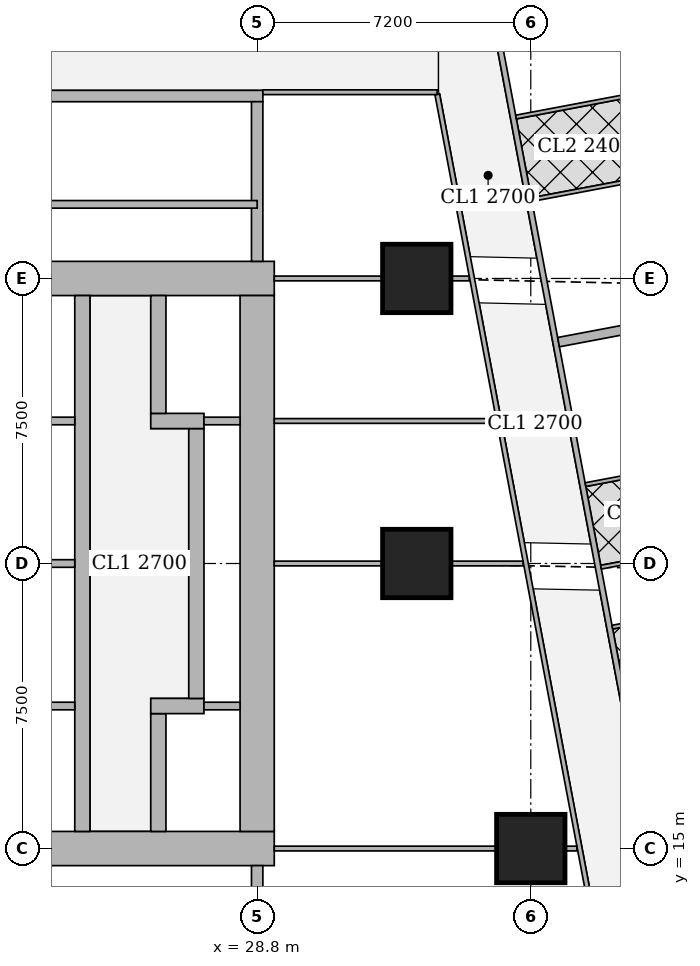
"""IFC4 building model, lengths in metres.
Left out: names, types, materials, properties, quantities, classifications, styles, units other than length and angle.
Written with IfcOpenShell. Run it as: python <this file> out.ifc"""

import sys

from ifc_helpers import new_model, si_unit, direction, frame, frame_2d, origin, origin_2d, place, context, subcontext, project, spatial, rectangle, extrude, element, fill, save


model = new_model("IFC4")
c1 = context("Model", 3, precision=1e-05, world=origin(), true_north=direction((0.0, 1.0)))
c2 = subcontext(c1, "Body", "Model", "MODEL_VIEW")
j1 = project(units=[si_unit("LENGTHUNIT", "METRE"), si_unit("PLANEANGLEUNIT", "RADIAN")], contexts=[c1])
p1 = place(None, origin())
s1 = spatial("IfcSite", under=j1, at=p1, CompositionType="ELEMENT")
p2 = place(p1, origin())
s2 = spatial("IfcBuilding", under=s1, at=p2, CompositionType="ELEMENT")
p3 = place(p2, frame((0.0, 0.0, 31.25)))
s3 = spatial("IfcBuildingStorey", under=s2, at=p3, CompositionType="ELEMENT", Elevation=31.25)
for number, where, z_axis, x_axis in (
    (1, (36.0, 15.0, 0.0), (0.0, 0.0, 1.0), (1.0, 0.0, 0.0)),
    (2, (33.0, 22.5, 0.0), (0.0, 0.0, 1.0), (1.0, 0.0, 0.0)),
    (3, (33.0, 30.0, 0.0), (0.0, 0.0, 1.0), (1.0, 0.0, 0.0)),
):
    element("IfcColumn", number, at=place(p3, frame(where, z_axis=z_axis, x_axis=x_axis)), inside=s3, PredefinedType="COLUMN", context=c2, shape_type="SweptSolid", body=[
        extrude(rectangle(XDim=1.8, YDim=1.8, at=origin_2d()), origin(), (0.0, 0.0, 1.0), 3.75),
    ])
p4 = place(p3, frame((13.95, 15.0, 0.0), z_axis=(0.0, 0.0, 1.0), x_axis=(1.0, 0.0, 0.0)))
e4 = element("IfcWall", 4, at=p4, inside=s3, PredefinedType="SHEAR", context=c2, shape_type="SweptSolid", body=[
    extrude(rectangle(XDim=15.3, YDim=0.9, at=frame_2d((7.65, 0.0))), origin(), (0.0, 0.0, 1.0), 3.75),
])
p5 = place(p4, frame((4.45, 0.0, 0.0)))
e5 = element("IfcOpeningElement", 5, at=p5, cuts=e4, PredefinedType="OPENING", context=c2, shape_type="SweptSolid", body=[
    extrude(rectangle(XDim=1.8, YDim=2.1, at=frame_2d((0.9, 1.05))), frame((0.0, 0.46, 0.0), z_axis=(0.0, -1.0, 0.0), x_axis=(1.0, 0.0, 0.0)), (0.0, 0.0, 1.0), 0.92),
])
p6 = place(p4, frame((10.7, 0.0, 0.0)))
e6 = element("IfcOpeningElement", 6, at=p6, cuts=e4, PredefinedType="OPENING", context=c2, shape_type="SweptSolid", body=[
    extrude(rectangle(XDim=1.1, YDim=2.1, at=frame_2d((0.55, 1.05))), frame((0.0, 0.46, 0.0), z_axis=(0.0, -1.0, 0.0), x_axis=(1.0, 0.0, 0.0)), (0.0, 0.0, 1.0), 0.92),
])
p7 = place(p3, frame((13.95, 30.0, 0.0), z_axis=(0.0, 0.0, 1.0), x_axis=(1.0, 0.0, 0.0)))
e7 = element("IfcWall", 7, at=p7, inside=s3, PredefinedType="SHEAR", context=c2, shape_type="SweptSolid", body=[
    extrude(rectangle(XDim=15.3, YDim=0.9, at=frame_2d((7.65, 0.0))), origin(), (0.0, 0.0, 1.0), 3.75),
])
p8 = place(p7, frame((4.45, 0.0, 0.0)))
e8 = element("IfcOpeningElement", 8, at=p8, cuts=e7, PredefinedType="OPENING", context=c2, shape_type="SweptSolid", body=[
    extrude(rectangle(XDim=1.8, YDim=2.1, at=frame_2d((0.9, 1.05))), frame((0.0, 0.46, 0.0), z_axis=(0.0, -1.0, 0.0), x_axis=(1.0, 0.0, 0.0)), (0.0, 0.0, 1.0), 0.92),
])
p9 = place(p7, frame((10.7, 0.0, 0.0)))
e9 = element("IfcOpeningElement", 9, at=p9, cuts=e7, PredefinedType="OPENING", context=c2, shape_type="SweptSolid", body=[
    extrude(rectangle(XDim=1.1, YDim=2.1, at=frame_2d((0.55, 1.05))), frame((0.0, 0.46, 0.0), z_axis=(0.0, -1.0, 0.0), x_axis=(1.0, 0.0, 0.0)), (0.0, 0.0, 1.0), 0.92),
])
p10 = place(p3, frame((28.8, 15.45, 0.0), z_axis=(0.0, 0.0, 1.0), x_axis=(0.0, 1.0, 0.0)))
e10 = element("IfcWall", 10, at=p10, inside=s3, PredefinedType="SHEAR", context=c2, shape_type="SweptSolid", body=[
    extrude(rectangle(XDim=14.1, YDim=0.9, at=frame_2d((7.05, 0.0))), origin(), (0.0, 0.0, 1.0), 3.75),
])
p11 = place(p3, frame((24.2, 15.45, 0.0), z_axis=(0.0, 0.0, 1.0), x_axis=(0.0, 1.0, 0.0)))
e11 = element("IfcWall", 11, at=p11, inside=s3, PredefinedType="SHEAR", context=c2, shape_type="SweptSolid", body=[
    extrude(rectangle(XDim=14.1, YDim=0.4, at=frame_2d((7.05, 0.0))), origin(), (0.0, 0.0, 1.0), 3.75),
])
p12 = place(p3, frame((26.2, 15.45, 0.0), z_axis=(0.0, 0.0, 1.0), x_axis=(0.0, 1.0, 0.0)))
e12 = element("IfcWall", 12, at=p12, inside=s3, PredefinedType="SHEAR", context=c2, shape_type="SweptSolid", body=[
    extrude(rectangle(XDim=3.1, YDim=0.4, at=frame_2d((1.55, 0.0))), origin(), (0.0, 0.0, 1.0), 3.75),
])
p13 = place(p12, frame((0.825, 0.0, 0.0)))
e13 = element("IfcOpeningElement", 13, at=p13, cuts=e12, PredefinedType="OPENING", context=c2, shape_type="SweptSolid", body=[
    extrude(rectangle(XDim=1.2, YDim=2.1, at=frame_2d((0.6, 1.05))), frame((0.0, 0.21, 0.0), z_axis=(0.0, -1.0, 0.0), x_axis=(1.0, 0.0, 0.0)), (0.0, 0.0, 1.0), 0.42),
])
p14 = place(p3, frame((26.0, 18.75, 0.0), z_axis=(0.0, 0.0, 1.0), x_axis=(1.0, 0.0, 0.0)))
e14 = element("IfcWall", 14, at=p14, inside=s3, PredefinedType="SHEAR", context=c2, shape_type="SweptSolid", body=[
    extrude(rectangle(XDim=1.4, YDim=0.4, at=frame_2d((0.7, 0.0))), origin(), (0.0, 0.0, 1.0), 3.75),
])
p15 = place(p3, frame((27.2, 18.95, 0.0), z_axis=(0.0, 0.0, 1.0), x_axis=(0.0, 1.0, 0.0)))
e15 = element("IfcWall", 15, at=p15, inside=s3, PredefinedType="SHEAR", context=c2, shape_type="SweptSolid", body=[
    extrude(rectangle(XDim=7.1, YDim=0.4, at=frame_2d((3.55, 0.0))), origin(), (0.0, 0.0, 1.0), 3.75),
])
p16 = place(p3, frame((26.0, 26.25, 0.0), z_axis=(0.0, 0.0, 1.0), x_axis=(1.0, 0.0, 0.0)))
e16 = element("IfcWall", 16, at=p16, inside=s3, PredefinedType="SHEAR", context=c2, shape_type="SweptSolid", body=[
    extrude(rectangle(XDim=1.4, YDim=0.4, at=frame_2d((0.7, 0.0))), origin(), (0.0, 0.0, 1.0), 3.75),
])
p17 = place(p3, frame((26.2, 26.45, 0.0), z_axis=(0.0, 0.0, 1.0), x_axis=(0.0, 1.0, 0.0)))
e17 = element("IfcWall", 17, at=p17, inside=s3, PredefinedType="SHEAR", context=c2, shape_type="SweptSolid", body=[
    extrude(rectangle(XDim=3.1, YDim=0.4, at=frame_2d((1.55, 0.0))), origin(), (0.0, 0.0, 1.0), 3.75),
])
p18 = place(p17, frame((1.075, 0.0, 0.0)))
e18 = element("IfcOpeningElement", 18, at=p18, cuts=e17, PredefinedType="OPENING", context=c2, shape_type="SweptSolid", body=[
    extrude(rectangle(XDim=1.2, YDim=2.1, at=frame_2d((0.6, 1.05))), frame((0.0, 0.21, 0.0), z_axis=(0.0, -1.0, 0.0), x_axis=(1.0, 0.0, 0.0)), (0.0, 0.0, 1.0), 0.42),
])
p19 = place(p3, frame((28.8, 10.35, 0.0), z_axis=(0.0, 0.0, 1.0), x_axis=(0.0, 1.0, 0.0)))
e19 = element("IfcWall", 19, at=p19, inside=s3, PredefinedType="SHEAR", context=c2, shape_type="SweptSolid", body=[
    extrude(rectangle(XDim=4.2, YDim=0.3, at=frame_2d((2.1, 0.0))), origin(), (0.0, 0.0, 1.0), 3.75),
])
p20 = place(p3, frame((21.45, 34.8, 0.0), z_axis=(0.0, 0.0, 1.0), x_axis=(1.0, 0.0, 0.0)))
e20 = element("IfcWall", 20, at=p20, inside=s3, PredefinedType="SHEAR", context=c2, shape_type="SweptSolid", body=[
    extrude(rectangle(XDim=7.5, YDim=0.3, at=frame_2d((3.75, 0.0))), origin(), (0.0, 0.0, 1.0), 3.75),
])
p21 = place(p20, frame((0.5, 0.0, 0.0)))
e21 = element("IfcOpeningElement", 21, at=p21, cuts=e20, PredefinedType="OPENING", context=c2, shape_type="SweptSolid", body=[
    extrude(rectangle(XDim=1.1, YDim=2.1, at=frame_2d((0.55, 1.05))), frame((0.0, 0.16, 0.0), z_axis=(0.0, -1.0, 0.0), x_axis=(1.0, 0.0, 0.0)), (0.0, 0.0, 1.0), 0.32),
])
p22 = place(p3, frame((28.8, 30.45, 0.0), z_axis=(0.0, 0.0, 1.0), x_axis=(0.0, 1.0, 0.0)))
e22 = element("IfcWall", 22, at=p22, inside=s3, PredefinedType="SHEAR", context=c2, shape_type="SweptSolid", body=[
    extrude(rectangle(XDim=4.2, YDim=0.3, at=frame_2d((2.1, 0.0))), origin(), (0.0, 0.0, 1.0), 3.75),
])
p23 = place(p3, frame((35.094, 36.585, 0.0), z_axis=(0.0, 0.0, 1.0), x_axis=(0.185588860311, -0.982627485331, 0.0)))
e23 = element("IfcWall", 23, at=p23, inside=s3, PredefinedType="SOLIDWALL", context=c2, shape_type="SweptSolid", body=[
    extrude(rectangle(XDim=34.797, YDim=0.15, at=frame_2d((17.399, 0.0))), origin(), (0.0, 0.0, 1.0), 2.5),
])
p24 = place(p23, frame((6.012, 0.0, 0.0)))
e24 = element("IfcOpeningElement", 24, at=p24, cuts=e23, PredefinedType="OPENING", context=c2, shape_type="SweptSolid", body=[
    extrude(rectangle(XDim=1.0, YDim=2.1, at=frame_2d((0.5, 1.05))), frame((0.0, 0.085, 0.0), z_axis=(0.0, -1.0, 0.0), x_axis=(1.0, 0.0, 0.0)), (0.0, 0.0, 1.0), 0.17),
])
p25 = place(p23, frame((9.828, 0.0, 0.0)))
e25 = element("IfcOpeningElement", 25, at=p25, cuts=e23, PredefinedType="OPENING", context=c2, shape_type="SweptSolid", body=[
    extrude(rectangle(XDim=1.0, YDim=2.1, at=frame_2d((0.5, 1.05))), frame((0.0, 0.085, 0.0), z_axis=(0.0, -1.0, 0.0), x_axis=(1.0, 0.0, 0.0)), (0.0, 0.0, 1.0), 0.17),
])
p26 = place(p23, frame((25.9, 0.0, 0.0)))
e26 = element("IfcOpeningElement", 26, at=p26, cuts=e23, PredefinedType="OPENING", context=c2, shape_type="SweptSolid", body=[
    extrude(rectangle(XDim=1.0, YDim=2.1, at=frame_2d((0.5, 1.05))), frame((0.0, 0.085, 0.0), z_axis=(0.0, -1.0, 0.0), x_axis=(1.0, 0.0, 0.0)), (0.0, 0.0, 1.0), 0.17),
])
p27 = place(p3, frame((37.514, 42.089, 0.0), z_axis=(0.0, 0.0, 1.0), x_axis=(0.185543450498, -0.982636060796, 0.0)))
e27 = element("IfcWall", 27, at=p27, inside=s3, PredefinedType="PARTITIONING", context=c2, shape_type="SweptSolid", body=[
    extrude(rectangle(XDim=9.513, YDim=0.1, at=frame_2d((4.757, 0.0))), origin(), (0.0, 0.0, 1.0), 3.5),
])
p28 = place(p27, frame((8.008, 0.0, 0.0)))
e28 = element("IfcOpeningElement", 28, at=p28, cuts=e27, PredefinedType="OPENING", context=c2, shape_type="SweptSolid", body=[
    extrude(rectangle(XDim=0.9, YDim=2.1, at=frame_2d((0.45, 1.05))), frame((0.0, 0.06, 0.0), z_axis=(0.0, -1.0, 0.0), x_axis=(1.0, 0.0, 0.0)), (0.0, 0.0, 1.0), 0.12),
])
p29 = place(p27, frame((2.63, 0.0, 0.0)))
e29 = element("IfcOpeningElement", 29, at=p29, cuts=e27, PredefinedType="OPENING", context=c2, shape_type="SweptSolid", body=[
    extrude(rectangle(XDim=0.9, YDim=2.1, at=frame_2d((0.45, 1.05))), frame((0.0, 0.06, 0.0), z_axis=(0.0, -1.0, 0.0), x_axis=(1.0, 0.0, 0.0)), (0.0, 0.0, 1.0), 0.12),
])
p30 = place(p27, frame((5.341, 0.0, 0.0)))
e30 = element("IfcOpeningElement", 30, at=p30, cuts=e27, PredefinedType="OPENING", context=c2, shape_type="SweptSolid", body=[
    extrude(rectangle(XDim=0.9, YDim=2.1, at=frame_2d((0.45, 1.05))), frame((0.0, 0.06, 0.0), z_axis=(0.0, -1.0, 0.0), x_axis=(1.0, 0.0, 0.0)), (0.0, 0.0, 1.0), 0.12),
])
p31 = place(p3, frame((39.289, 32.692, 0.0), z_axis=(0.0, 0.0, 1.0), x_axis=(-0.982633623707, -0.185556356831, 0.0)))
e31 = element("IfcWall", 31, at=p31, inside=s3, PredefinedType="PARTITIONING", context=c2, shape_type="SweptSolid", body=[
    extrude(rectangle(XDim=3.325, YDim=0.1, at=frame_2d((1.663, 0.0))), origin(), (0.0, 0.0, 1.0), 3.5),
])
p32 = place(p3, frame((38.829, 34.855, 0.0), z_axis=(0.0, 0.0, 1.0), x_axis=(-0.982610347627, -0.185679575441, 0.0)))
e32 = element("IfcWall", 32, at=p32, inside=s3, PredefinedType="PARTITIONING", context=c2, shape_type="SweptSolid", body=[
    extrude(rectangle(XDim=3.274, YDim=0.1, at=frame_2d((1.637, 0.0))), origin(), (0.0, 0.0, 1.0), 3.5),
])
for number, where, z_axis, x_axis in (
    (33, (40.657, 25.183, 0.0), (0.0, 0.0, 1.0), (-0.983, -0.186, 0.0)),
    (34, (41.365, 21.433, 0.0), (0.0, 0.0, 1.0), (-0.983, -0.186, 0.0)),
):
    element("IfcWall", number, at=place(p3, frame(where, z_axis=z_axis, x_axis=x_axis)), inside=s3, PredefinedType="PARTITIONING", context=c2, shape_type="SweptSolid", body=[
        extrude(rectangle(XDim=3.275, YDim=0.1, at=frame_2d((1.637, 0.0))), origin(), (0.0, 0.0, 1.0), 3.5),
    ])
p33 = place(p3, frame((41.067, 23.011, 0.0), z_axis=(0.0, 0.0, 1.0), x_axis=(-0.982618057925, -0.185638768151, 0.0)))
e35 = element("IfcWall", 35, at=p33, inside=s3, PredefinedType="PARTITIONING", context=c2, shape_type="SweptSolid", body=[
    extrude(rectangle(XDim=3.275, YDim=0.1, at=frame_2d((1.637, 0.0))), origin(), (0.0, 0.0, 1.0), 2.5),
])
p34 = place(p3, frame((41.177, 29.164, 0.0), z_axis=(0.0, 0.0, 1.0), x_axis=(-0.982612837616, -0.185666398014, 0.0)))
e36 = element("IfcWall", 36, at=p34, inside=s3, PredefinedType="SOLIDWALL", context=c2, shape_type="SweptSolid", body=[
    extrude(rectangle(XDim=4.525, YDim=0.25, at=frame_2d((2.262, 0.0))), origin(), (0.0, 0.0, 1.0), 2.5),
])
p35 = place(p3, frame((28.95, 34.9, 0.0), z_axis=(0.0, 0.0, 1.0), x_axis=(1.0, 0.0, 0.0)))
e37 = element("IfcWall", 37, at=p35, inside=s3, PredefinedType="PARTITIONING", context=c2, shape_type="SweptSolid", body=[
    extrude(rectangle(XDim=4.588, YDim=0.125, at=frame_2d((2.294, 0.0))), origin(), (0.0, 0.0, 1.0), 3.5),
])
p36 = place(p3, frame((38.202, 10.163, 0.0), z_axis=(0.0, 0.0, 1.0), x_axis=(-0.185610321132, 0.982623431783, 0.0)))
e38 = element("IfcWall", 38, at=p36, inside=s3, PredefinedType="PARTITIONING", context=c2, shape_type="SweptSolid", body=[
    extrude(rectangle(XDim=25.111, YDim=0.125, at=frame_2d((12.556, 0.0))), origin(), (0.0, 0.0, 1.0), 2.5),
])
p37 = place(p36, frame((0.708, 0.0, 0.0)))
e39 = element("IfcOpeningElement", 39, at=p37, cuts=e38, PredefinedType="OPENING", context=c2, shape_type="SweptSolid", body=[
    extrude(rectangle(XDim=1.0, YDim=2.1, at=frame_2d((0.5, 1.05))), frame((0.0, 0.073, 0.0), z_axis=(0.0, -1.0, 0.0), x_axis=(1.0, 0.0, 0.0)), (0.0, 0.0, 1.0), 0.145),
])
p38 = place(p36, frame((6.1, 0.0, 0.0)))
e40 = element("IfcOpeningElement", 40, at=p38, cuts=e38, PredefinedType="OPENING", context=c2, shape_type="SweptSolid", body=[
    extrude(rectangle(XDim=1.0, YDim=2.1, at=frame_2d((0.5, 1.05))), frame((0.0, 0.073, 0.0), z_axis=(0.0, -1.0, 0.0), x_axis=(1.0, 0.0, 0.0)), (0.0, 0.0, 1.0), 0.145),
])
p39 = place(p36, frame((13.378, 0.0, 0.0)))
e41 = element("IfcOpeningElement", 41, at=p39, cuts=e38, PredefinedType="OPENING", context=c2, shape_type="SweptSolid", body=[
    extrude(rectangle(XDim=1.0, YDim=2.1, at=frame_2d((0.5, 1.05))), frame((0.0, 0.073, 0.0), z_axis=(0.0, -1.0, 0.0), x_axis=(1.0, 0.0, 0.0)), (0.0, 0.0, 1.0), 0.145),
])
p40 = place(p36, frame((17.194, 0.0, 0.0)))
e42 = element("IfcOpeningElement", 42, at=p40, cuts=e38, PredefinedType="OPENING", context=c2, shape_type="SweptSolid", body=[
    extrude(rectangle(XDim=1.0, YDim=2.1, at=frame_2d((0.5, 1.05))), frame((0.0, 0.073, 0.0), z_axis=(0.0, -1.0, 0.0), x_axis=(1.0, 0.0, 0.0)), (0.0, 0.0, 1.0), 0.145),
])
p41 = place(p36, frame((21.35, 0.0, 0.0)))
e43 = element("IfcOpeningElement", 43, at=p41, cuts=e38, PredefinedType="OPENING", context=c2, shape_type="SweptSolid", body=[
    extrude(rectangle(XDim=1.0, YDim=2.1, at=frame_2d((0.5, 1.05))), frame((0.0, 0.073, 0.0), z_axis=(0.0, -1.0, 0.0), x_axis=(1.0, 0.0, 0.0)), (0.0, 0.0, 1.0), 0.145),
])
p42 = place(p3, frame((29.25, 15.0, 0.0), z_axis=(0.0, 0.0, 1.0), x_axis=(1.0, 0.0, 0.0)))
e44 = element("IfcWall", 44, at=p42, inside=s3, PredefinedType="PARTITIONING", context=c2, shape_type="SweptSolid", body=[
    extrude(rectangle(XDim=5.849, YDim=0.125, at=frame_2d((2.925, 0.0))), origin(), (0.0, 0.0, 1.0), 3.5),
])
p43 = place(p3, frame((36.901, 15.0, 0.0), z_axis=(0.0, 0.0, 1.0), x_axis=(1.0, 0.0, 0.0)))
e45 = element("IfcWall", 45, at=p43, inside=s3, PredefinedType="PARTITIONING", context=c2, shape_type="SweptSolid", body=[
    extrude(rectangle(XDim=0.312, YDim=0.125, at=frame_2d((0.156, 0.0))), origin(), (0.0, 0.0, 1.0), 3.5),
])
p44 = place(p3, frame((29.25, 22.5, 0.0), z_axis=(0.0, 0.0, 1.0), x_axis=(1.0, 0.0, 0.0)))
e46 = element("IfcWall", 46, at=p44, inside=s3, PredefinedType="PARTITIONING", context=c2, shape_type="SweptSolid", body=[
    extrude(rectangle(XDim=2.849, YDim=0.125, at=frame_2d((1.425, 0.0))), origin(), (0.0, 0.0, 1.0), 3.5),
])
p45 = place(p3, frame((33.901, 22.5, 0.0), z_axis=(0.0, 0.0, 1.0), x_axis=(1.0, 0.0, 0.0)))
e47 = element("IfcWall", 47, at=p45, inside=s3, PredefinedType="PARTITIONING", context=c2, shape_type="SweptSolid", body=[
    extrude(rectangle(XDim=1.895, YDim=0.125, at=frame_2d((0.948, 0.0))), origin(), (0.0, 0.0, 1.0), 2.5),
])
p46 = place(p3, frame((29.25, 26.25, 0.0), z_axis=(0.0, 0.0, 1.0), x_axis=(1.0, 0.0, 0.0)))
e48 = element("IfcWall", 48, at=p46, inside=s3, PredefinedType="PARTITIONING", context=c2, shape_type="SweptSolid", body=[
    extrude(rectangle(XDim=5.838, YDim=0.125, at=frame_2d((2.919, 0.0))), origin(), (0.0, 0.0, 1.0), 3.5),
])
p47 = place(p3, frame((29.25, 30.0, 0.0), z_axis=(0.0, 0.0, 1.0), x_axis=(1.0, 0.0, 0.0)))
e49 = element("IfcWall", 49, at=p47, inside=s3, PredefinedType="PARTITIONING", context=c2, shape_type="SweptSolid", body=[
    extrude(rectangle(XDim=2.849, YDim=0.125, at=frame_2d((1.425, 0.0))), origin(), (0.0, 0.0, 1.0), 3.5),
])
p48 = place(p3, frame((33.901, 30.0, 0.0), z_axis=(0.0, 0.0, 1.0), x_axis=(1.0, 0.0, 0.0)))
e50 = element("IfcWall", 50, at=p48, inside=s3, PredefinedType="PARTITIONING", context=c2, shape_type="SweptSolid", body=[
    extrude(rectangle(XDim=0.478, YDim=0.125, at=frame_2d((0.239, 0.0))), origin(), (0.0, 0.0, 1.0), 2.5),
])
p49 = place(p3, frame((23.0, 31.95, 0.0), z_axis=(0.0, 0.0, 1.0), x_axis=(1.0, 0.0, 0.0)))
e51 = element("IfcWall", 51, at=p49, inside=s3, PredefinedType="SHEAR", context=c2, shape_type="SweptSolid", body=[
    extrude(rectangle(XDim=5.8, YDim=0.2, at=frame_2d((2.9, 0.0))), origin(), (0.0, 0.0, 1.0), 3.75),
])
for number, where, z_axis, x_axis in (
    (52, (21.8, 18.75, 0.0), (0.0, 0.0, 1.0), (1.0, 0.0, 0.0)),
    (53, (21.8, 22.5, 0.0), (0.0, 0.0, 1.0), (1.0, 0.0, 0.0)),
    (54, (21.8, 26.25, 0.0), (0.0, 0.0, 1.0), (1.0, 0.0, 0.0)),
):
    element("IfcWall", number, at=place(p3, frame(where, z_axis=z_axis, x_axis=x_axis)), inside=s3, PredefinedType="SOLIDWALL", context=c2, shape_type="SweptSolid", body=[
        extrude(rectangle(XDim=2.2, YDim=0.2, at=frame_2d((1.1, 0.0))), origin(), (0.0, 0.0, 1.0), 3.5),
    ])
for number, where, z_axis, x_axis in (
    (55, (27.4, 18.75, 0.0), (0.0, 0.0, 1.0), (1.0, 0.0, 0.0)),
    (56, (27.4, 26.25, 0.0), (0.0, 0.0, 1.0), (1.0, 0.0, 0.0)),
):
    element("IfcWall", number, at=place(p3, frame(where, z_axis=z_axis, x_axis=x_axis)), inside=s3, PredefinedType="SOLIDWALL", context=c2, shape_type="SweptSolid", body=[
        extrude(rectangle(XDim=0.95, YDim=0.2, at=frame_2d((0.475, 0.0))), origin(), (0.0, 0.0, 1.0), 3.5),
    ])
p50 = place(p24, origin())
e57 = element("IfcDoor", 57, at=p50, inside=s3, OperationType="SINGLE_SWING_RIGHT", PredefinedType="DOOR", context=c2, shape_type="SweptSolid", body=[
    extrude(rectangle(XDim=1.0, YDim=2.1, at=frame_2d((0.5, 1.05))), frame((0.0, 0.025, 0.0), z_axis=(0.0, -1.0, 0.0), x_axis=(1.0, 0.0, 0.0)), (0.0, 0.0, 1.0), 0.05),
])
fill(e24, e57)
p51 = place(p25, origin())
e58 = element("IfcDoor", 58, at=p51, inside=s3, OperationType="SINGLE_SWING_LEFT", PredefinedType="DOOR", context=c2, shape_type="SweptSolid", body=[
    extrude(rectangle(XDim=1.0, YDim=2.1, at=frame_2d((0.5, 1.05))), frame((0.0, 0.025, 0.0), z_axis=(0.0, -1.0, 0.0), x_axis=(1.0, 0.0, 0.0)), (0.0, 0.0, 1.0), 0.05),
])
fill(e25, e58)
p52 = place(p38, origin())
e59 = element("IfcDoor", 59, at=p52, inside=s3, OperationType="SINGLE_SWING_LEFT", PredefinedType="DOOR", context=c2, shape_type="SweptSolid", body=[
    extrude(rectangle(XDim=1.0, YDim=2.1, at=frame_2d((0.5, 1.05))), frame((0.0, 0.025, 0.0), z_axis=(0.0, -1.0, 0.0), x_axis=(1.0, 0.0, 0.0)), (0.0, 0.0, 1.0), 0.05),
])
fill(e40, e59)
p53 = place(p39, origin())
e60 = element("IfcDoor", 60, at=p53, inside=s3, OperationType="SINGLE_SWING_LEFT", PredefinedType="DOOR", context=c2, shape_type="SweptSolid", body=[
    extrude(rectangle(XDim=1.0, YDim=2.1, at=frame_2d((0.5, 1.05))), frame((0.0, 0.025, 0.0), z_axis=(0.0, -1.0, 0.0), x_axis=(1.0, 0.0, 0.0)), (0.0, 0.0, 1.0), 0.05),
])
fill(e41, e60)
p54 = place(p40, origin())
e61 = element("IfcDoor", 61, at=p54, inside=s3, OperationType="SINGLE_SWING_LEFT", PredefinedType="DOOR", context=c2, shape_type="SweptSolid", body=[
    extrude(rectangle(XDim=1.0, YDim=2.1, at=frame_2d((0.5, 1.05))), frame((0.0, 0.025, 0.0), z_axis=(0.0, -1.0, 0.0), x_axis=(1.0, 0.0, 0.0)), (0.0, 0.0, 1.0), 0.05),
])
fill(e42, e61)
p55 = place(p41, origin())
e62 = element("IfcDoor", 62, at=p55, inside=s3, OperationType="SINGLE_SWING_LEFT", PredefinedType="DOOR", context=c2, shape_type="SweptSolid", body=[
    extrude(rectangle(XDim=1.0, YDim=2.1, at=frame_2d((0.5, 1.05))), frame((0.0, 0.025, 0.0), z_axis=(0.0, -1.0, 0.0), x_axis=(1.0, 0.0, 0.0)), (0.0, 0.0, 1.0), 0.05),
])
fill(e43, e62)
p56 = place(p6, origin())
e63 = element("IfcDoor", 63, at=p56, inside=s3, OperationType="SINGLE_SWING_RIGHT", PredefinedType="DOOR", context=c2, shape_type="SweptSolid", body=[
    extrude(rectangle(XDim=1.1, YDim=2.1, at=frame_2d((0.55, 1.05))), frame((0.0, 0.025, 0.0), z_axis=(0.0, -1.0, 0.0), x_axis=(1.0, 0.0, 0.0)), (0.0, 0.0, 1.0), 0.05),
])
fill(e6, e63)
p57 = place(p9, origin())
e64 = element("IfcDoor", 64, at=p57, inside=s3, OperationType="SINGLE_SWING_RIGHT", PredefinedType="DOOR", context=c2, shape_type="SweptSolid", body=[
    extrude(rectangle(XDim=1.1, YDim=2.1, at=frame_2d((0.55, 1.05))), frame((0.0, 0.025, 0.0), z_axis=(0.0, -1.0, 0.0), x_axis=(1.0, 0.0, 0.0)), (0.0, 0.0, 1.0), 0.05),
])
fill(e9, e64)
p58 = place(p13, origin())
e65 = element("IfcDoor", 65, at=p58, inside=s3, OperationType="DOUBLE_DOOR_SLIDING", PredefinedType="DOOR", context=c2, shape_type="SweptSolid", body=[
    extrude(rectangle(XDim=1.2, YDim=2.1, at=frame_2d((0.6, 1.05))), frame((0.0, 0.025, 0.0), z_axis=(0.0, -1.0, 0.0), x_axis=(1.0, 0.0, 0.0)), (0.0, 0.0, 1.0), 0.05),
])
fill(e13, e65)
p59 = place(p18, origin())
e66 = element("IfcDoor", 66, at=p59, inside=s3, OperationType="DOUBLE_DOOR_SLIDING", PredefinedType="DOOR", context=c2, shape_type="SweptSolid", body=[
    extrude(rectangle(XDim=1.2, YDim=2.1, at=frame_2d((0.6, 1.05))), frame((0.0, 0.025, 0.0), z_axis=(0.0, -1.0, 0.0), x_axis=(1.0, 0.0, 0.0)), (0.0, 0.0, 1.0), 0.05),
])
fill(e18, e66)
save(model, sys.argv[1])
